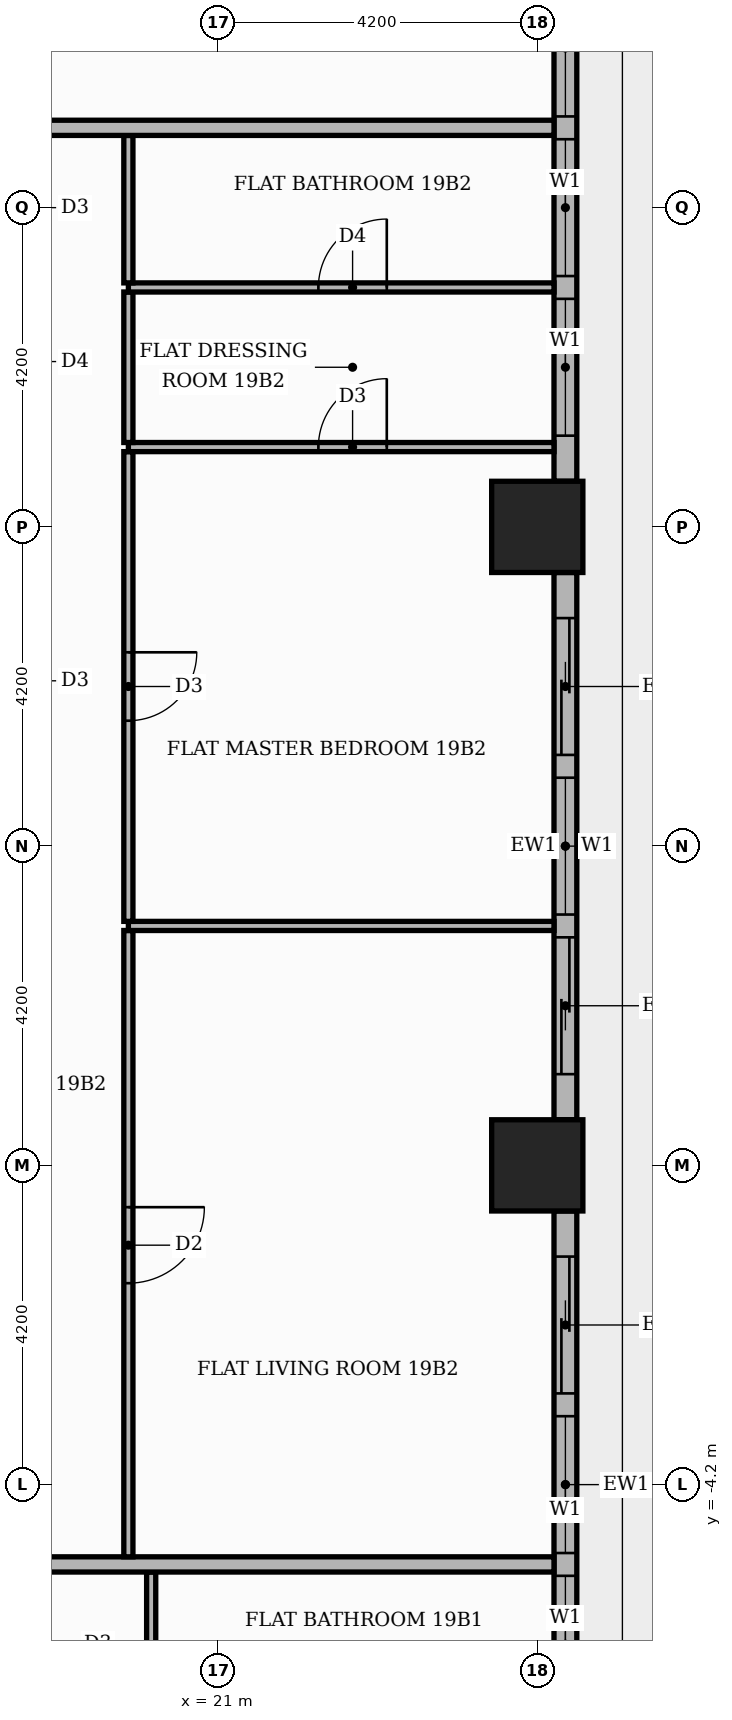
"""IFC4 building model, lengths in metres.
Left out: names, types, materials, properties, quantities, classifications, styles, units other than length and angle.
Written with IfcOpenShell. Run it as: python <this file> out.ifc"""

import sys

from ifc_helpers import new_model, si_unit, direction, frame, frame_2d, origin, origin_2d, place, context, subcontext, project, spatial, rectangle, extrude, element, fill, save


model = new_model("IFC4")
c1 = context("Model", 3, precision=1e-05, world=origin(), true_north=direction((0.0, 1.0)))
c2 = subcontext(c1, "Body", "Model", "MODEL_VIEW")
j1 = project(units=[si_unit("LENGTHUNIT", "METRE"), si_unit("PLANEANGLEUNIT", "RADIAN")], contexts=[c1])
p1 = place(None, origin())
s1 = spatial("IfcSite", under=j1, at=p1, CompositionType="ELEMENT")
p2 = place(p1, origin())
s2 = spatial("IfcBuilding", under=s1, at=p2, CompositionType="ELEMENT")
p3 = place(p2, frame((0.0, 0.0, 83.1)))
s3 = spatial("IfcBuildingStorey", under=s2, at=p3, CompositionType="ELEMENT", Elevation=83.1)
for number, where, z_axis, x_axis in (
    (1, (25.2, 0.0, 0.0), (0.0, 0.0, 1.0), (1.0, 0.0, 0.0)),
    (2, (25.2, 8.4, 0.0), (0.0, 0.0, 1.0), (1.0, 0.0, 0.0)),
):
    element("IfcColumn", number, at=place(p3, frame(where, z_axis=z_axis, x_axis=x_axis)), inside=s3, PredefinedType="COLUMN", context=c2, shape_type="SweptSolid", body=[
        extrude(rectangle(XDim=1.2, YDim=1.2, at=origin_2d()), origin(), (0.0, 0.0, 1.0), 3.9),
    ])
p4 = place(p3, frame((25.57, -7.8, 0.0), z_axis=(0.0, 0.0, 1.0), x_axis=(0.0, 1.0, 0.0)))
e3 = element("IfcWall", 3, at=p4, inside=s3, PredefinedType="STANDARD", context=c2, shape_type="SweptSolid", body=[
    extrude(rectangle(XDim=7.2, YDim=0.3, at=frame_2d((3.6, 0.0))), origin(), (0.0, 0.0, 1.0), 3.48),
])
p5 = place(p4, frame((0.6, 0.0, 0.9)))
e4 = element("IfcOpeningElement", 4, at=p5, cuts=e3, PredefinedType="OPENING", context=c2, shape_type="SweptSolid", body=[
    extrude(rectangle(XDim=1.8, YDim=2.1, at=frame_2d((0.9, 1.05))), frame((0.0, 0.16, 0.0), z_axis=(0.0, -1.0, 0.0), x_axis=(1.0, 0.0, 0.0)), (0.0, 0.0, 1.0), 0.32),
])
p6 = place(p4, frame((2.7, 0.0, 0.9)))
e5 = element("IfcOpeningElement", 5, at=p6, cuts=e3, PredefinedType="OPENING", context=c2, shape_type="SweptSolid", body=[
    extrude(rectangle(XDim=1.8, YDim=2.1, at=frame_2d((0.9, 1.05))), frame((0.0, 0.16, 0.0), z_axis=(0.0, -1.0, 0.0), x_axis=(1.0, 0.0, 0.0)), (0.0, 0.0, 1.0), 0.32),
])
p7 = place(p4, frame((4.8, 0.0, 0.0)))
e6 = element("IfcOpeningElement", 6, at=p7, cuts=e3, PredefinedType="OPENING", context=c2, shape_type="SweptSolid", body=[
    extrude(rectangle(XDim=1.8, YDim=2.4, at=frame_2d((0.9, 1.2))), frame((0.0, 0.16, 0.0), z_axis=(0.0, -1.0, 0.0), x_axis=(1.0, 0.0, 0.0)), (0.0, 0.0, 1.0), 0.32),
])
p8 = place(p3, frame((25.57, 0.6, 0.0), z_axis=(0.0, 0.0, 1.0), x_axis=(0.0, 1.0, 0.0)))
e7 = element("IfcWall", 7, at=p8, inside=s3, PredefinedType="STANDARD", context=c2, shape_type="SweptSolid", body=[
    extrude(rectangle(XDim=7.2, YDim=0.3, at=frame_2d((3.6, 0.0))), origin(), (0.0, 0.0, 1.0), 3.48),
])
p9 = place(p8, frame((0.6, 0.0, 0.0)))
e8 = element("IfcOpeningElement", 8, at=p9, cuts=e7, PredefinedType="OPENING", context=c2, shape_type="SweptSolid", body=[
    extrude(rectangle(XDim=1.8, YDim=2.4, at=frame_2d((0.9, 1.2))), frame((0.0, 0.16, 0.0), z_axis=(0.0, -1.0, 0.0), x_axis=(1.0, 0.0, 0.0)), (0.0, 0.0, 1.0), 0.32),
])
p10 = place(p8, frame((2.7, 0.0, 0.9)))
e9 = element("IfcOpeningElement", 9, at=p10, cuts=e7, PredefinedType="OPENING", context=c2, shape_type="SweptSolid", body=[
    extrude(rectangle(XDim=1.8, YDim=2.1, at=frame_2d((0.9, 1.05))), frame((0.0, 0.16, 0.0), z_axis=(0.0, -1.0, 0.0), x_axis=(1.0, 0.0, 0.0)), (0.0, 0.0, 1.0), 0.32),
])
p11 = place(p8, frame((4.8, 0.0, 0.0)))
e10 = element("IfcOpeningElement", 10, at=p11, cuts=e7, PredefinedType="OPENING", context=c2, shape_type="SweptSolid", body=[
    extrude(rectangle(XDim=1.8, YDim=2.4, at=frame_2d((0.9, 1.2))), frame((0.0, 0.16, 0.0), z_axis=(0.0, -1.0, 0.0), x_axis=(1.0, 0.0, 0.0)), (0.0, 0.0, 1.0), 0.32),
])
p12 = place(p3, frame((25.57, 9.0, 0.0), z_axis=(0.0, 0.0, 1.0), x_axis=(0.0, 1.0, 0.0)))
e11 = element("IfcWall", 11, at=p12, inside=s3, PredefinedType="STANDARD", context=c2, shape_type="SweptSolid", body=[
    extrude(rectangle(XDim=7.2, YDim=0.3, at=frame_2d((3.6, 0.0))), origin(), (0.0, 0.0, 1.0), 3.48),
])
p13 = place(p12, frame((0.6, 0.0, 0.9)))
e12 = element("IfcOpeningElement", 12, at=p13, cuts=e11, PredefinedType="OPENING", context=c2, shape_type="SweptSolid", body=[
    extrude(rectangle(XDim=1.8, YDim=2.1, at=frame_2d((0.9, 1.05))), frame((0.0, 0.16, 0.0), z_axis=(0.0, -1.0, 0.0), x_axis=(1.0, 0.0, 0.0)), (0.0, 0.0, 1.0), 0.32),
])
p14 = place(p12, frame((2.7, 0.0, 0.9)))
e13 = element("IfcOpeningElement", 13, at=p14, cuts=e11, PredefinedType="OPENING", context=c2, shape_type="SweptSolid", body=[
    extrude(rectangle(XDim=1.8, YDim=2.1, at=frame_2d((0.9, 1.05))), frame((0.0, 0.16, 0.0), z_axis=(0.0, -1.0, 0.0), x_axis=(1.0, 0.0, 0.0)), (0.0, 0.0, 1.0), 0.32),
])
p15 = place(p12, frame((4.8, 0.0, 0.9)))
e14 = element("IfcOpeningElement", 14, at=p15, cuts=e11, PredefinedType="OPENING", context=c2, shape_type="SweptSolid", body=[
    extrude(rectangle(XDim=1.8, YDim=2.1, at=frame_2d((0.9, 1.05))), frame((0.0, 0.16, 0.0), z_axis=(0.0, -1.0, 0.0), x_axis=(1.0, 0.0, 0.0)), (0.0, 0.0, 1.0), 0.32),
])
p16 = place(p3, frame((20.12, -7.29, 0.0), z_axis=(0.0, 0.0, 1.0), x_axis=(0.0, 1.0, 0.0)))
e15 = element("IfcWall", 15, at=p16, inside=s3, PredefinedType="PARTITIONING", context=c2, shape_type="SweptSolid", body=[
    extrude(rectangle(XDim=1.94, YDim=0.12, at=frame_2d((0.97, 0.0))), origin(), (0.0, 0.0, 1.0), 3.48),
])
p17 = place(p3, frame((13.65, -5.25, 0.0), z_axis=(0.0, 0.0, 1.0), x_axis=(1.0, 0.0, 0.0)))
e16 = element("IfcWall", 16, at=p17, inside=s3, PredefinedType="PARTITIONING", context=c2, shape_type="SweptSolid", body=[
    extrude(rectangle(XDim=11.77, YDim=0.2, at=frame_2d((5.885, 0.0))), origin(), (0.0, 0.0, 1.0), 3.48),
])
p18 = place(p3, frame((19.82, -5.15, 0.0), z_axis=(0.0, 0.0, 1.0), x_axis=(0.0, 1.0, 0.0)))
e17 = element("IfcWall", 17, at=p18, inside=s3, PredefinedType="PARTITIONING", context=c2, shape_type="SweptSolid", body=[
    extrude(rectangle(XDim=8.24, YDim=0.12, at=frame_2d((4.12, 0.0))), origin(), (0.0, 0.0, 1.0), 3.48),
])
p19 = place(p18, frame((3.6, 0.0, 0.0)))
e18 = element("IfcOpeningElement", 18, at=p19, cuts=e17, PredefinedType="OPENING", context=c2, shape_type="SweptSolid", body=[
    extrude(rectangle(XDim=1.0, YDim=2.1, at=frame_2d((0.5, 1.05))), frame((0.0, 0.07, 0.0), z_axis=(0.0, -1.0, 0.0), x_axis=(1.0, 0.0, 0.0)), (0.0, 0.0, 1.0), 0.14),
])
p20 = place(p3, frame((19.82, 3.15, 0.0), z_axis=(0.0, 0.0, 1.0), x_axis=(1.0, 0.0, 0.0)))
e19 = element("IfcWall", 19, at=p20, inside=s3, PredefinedType="PARTITIONING", context=c2, shape_type="SweptSolid", body=[
    extrude(rectangle(XDim=5.6, YDim=0.12, at=frame_2d((2.8, 0.0))), origin(), (0.0, 0.0, 1.0), 3.48),
])
p21 = place(p3, frame((19.82, 3.21, 0.0), z_axis=(0.0, 0.0, 1.0), x_axis=(0.0, 1.0, 0.0)))
e20 = element("IfcWall", 20, at=p21, inside=s3, PredefinedType="PARTITIONING", context=c2, shape_type="SweptSolid", body=[
    extrude(rectangle(XDim=6.18, YDim=0.12, at=frame_2d((3.09, 0.0))), origin(), (0.0, 0.0, 1.0), 3.48),
])
p22 = place(p21, frame((2.64, 0.0, 0.0)))
e21 = element("IfcOpeningElement", 21, at=p22, cuts=e20, PredefinedType="OPENING", context=c2, shape_type="SweptSolid", body=[
    extrude(rectangle(XDim=0.9, YDim=2.1, at=frame_2d((0.45, 1.05))), frame((0.0, 0.07, 0.0), z_axis=(0.0, -1.0, 0.0), x_axis=(1.0, 0.0, 0.0)), (0.0, 0.0, 1.0), 0.14),
])
p23 = place(p3, frame((19.82, 9.45, 0.0), z_axis=(0.0, 0.0, 1.0), x_axis=(1.0, 0.0, 0.0)))
e22 = element("IfcWall", 22, at=p23, inside=s3, PredefinedType="PARTITIONING", context=c2, shape_type="SweptSolid", body=[
    extrude(rectangle(XDim=5.6, YDim=0.12, at=frame_2d((2.8, 0.0))), origin(), (0.0, 0.0, 1.0), 3.48),
])
p24 = place(p23, frame((2.5, 0.0, 0.0)))
e23 = element("IfcOpeningElement", 23, at=p24, cuts=e22, PredefinedType="OPENING", context=c2, shape_type="SweptSolid", body=[
    extrude(rectangle(XDim=0.9, YDim=2.1, at=frame_2d((0.45, 1.05))), frame((0.0, 0.07, 0.0), z_axis=(0.0, -1.0, 0.0), x_axis=(1.0, 0.0, 0.0)), (0.0, 0.0, 1.0), 0.14),
])
p25 = place(p3, frame((19.82, 9.51, 0.0), z_axis=(0.0, 0.0, 1.0), x_axis=(0.0, 1.0, 0.0)))
e24 = element("IfcWall", 24, at=p25, inside=s3, PredefinedType="PARTITIONING", context=c2, shape_type="SweptSolid", body=[
    extrude(rectangle(XDim=1.98, YDim=0.12, at=frame_2d((0.99, 0.0))), origin(), (0.0, 0.0, 1.0), 3.48),
])
p26 = place(p3, frame((19.82, 11.55, 0.0), z_axis=(0.0, 0.0, 1.0), x_axis=(1.0, 0.0, 0.0)))
e25 = element("IfcWall", 25, at=p26, inside=s3, PredefinedType="PARTITIONING", context=c2, shape_type="SweptSolid", body=[
    extrude(rectangle(XDim=5.6, YDim=0.12, at=frame_2d((2.8, 0.0))), origin(), (0.0, 0.0, 1.0), 3.48),
])
p27 = place(p26, frame((2.5, 0.0, 0.0)))
e26 = element("IfcOpeningElement", 26, at=p27, cuts=e25, PredefinedType="OPENING", context=c2, shape_type="SweptSolid", body=[
    extrude(rectangle(XDim=0.9, YDim=2.1, at=frame_2d((0.45, 1.05))), frame((0.0, 0.07, 0.0), z_axis=(0.0, -1.0, 0.0), x_axis=(1.0, 0.0, 0.0)), (0.0, 0.0, 1.0), 0.14),
])
p28 = place(p3, frame((19.82, 11.61, 0.0), z_axis=(0.0, 0.0, 1.0), x_axis=(0.0, 1.0, 0.0)))
e27 = element("IfcWall", 27, at=p28, inside=s3, PredefinedType="PARTITIONING", context=c2, shape_type="SweptSolid", body=[
    extrude(rectangle(XDim=1.94, YDim=0.12, at=frame_2d((0.97, 0.0))), origin(), (0.0, 0.0, 1.0), 3.48),
])
p29 = place(p3, frame((-13.65, 13.65, 0.0), z_axis=(0.0, 0.0, 1.0), x_axis=(1.0, 0.0, 0.0)))
e28 = element("IfcWall", 28, at=p29, inside=s3, PredefinedType="PARTITIONING", context=c2, shape_type="SweptSolid", body=[
    extrude(rectangle(XDim=39.07, YDim=0.2, at=frame_2d((19.535, 0.0))), origin(), (0.0, 0.0, 1.0), 3.48),
])
p30 = place(p29, frame((24.65, 0.0, 0.0)))
e29 = element("IfcOpeningElement", 29, at=p30, cuts=e28, PredefinedType="OPENING", context=c2, shape_type="SweptSolid", body=[
    extrude(rectangle(XDim=1.1, YDim=2.4, at=frame_2d((0.55, 1.2))), frame((0.0, 0.11, 0.0), z_axis=(0.0, -1.0, 0.0), x_axis=(1.0, 0.0, 0.0)), (0.0, 0.0, 1.0), 0.22),
])
p31 = place(p29, frame((16.25, 0.0, 0.0)))
e30 = element("IfcOpeningElement", 30, at=p31, cuts=e28, PredefinedType="OPENING", context=c2, shape_type="SweptSolid", body=[
    extrude(rectangle(XDim=1.1, YDim=2.4, at=frame_2d((0.55, 1.2))), frame((0.0, 0.11, 0.0), z_axis=(0.0, -1.0, 0.0), x_axis=(1.0, 0.0, 0.0)), (0.0, 0.0, 1.0), 0.22),
])
p32 = place(p5, origin())
e31 = element("IfcWindow", 31, at=p32, inside=s3, PartitioningType="SINGLE_PANEL", PredefinedType="WINDOW", context=c2, shape_type="SweptSolid", body=[
    extrude(rectangle(XDim=1.8, YDim=2.1, at=frame_2d((0.9, 1.05))), frame((0.0, 0.03, 0.0), z_axis=(0.0, -1.0, 0.0), x_axis=(1.0, 0.0, 0.0)), (0.0, 0.0, 1.0), 0.06),
])
fill(e4, e31)
p33 = place(p6, origin())
e32 = element("IfcWindow", 32, at=p33, inside=s3, PartitioningType="SINGLE_PANEL", PredefinedType="WINDOW", context=c2, shape_type="SweptSolid", body=[
    extrude(rectangle(XDim=1.8, YDim=2.1, at=frame_2d((0.9, 1.05))), frame((0.0, 0.03, 0.0), z_axis=(0.0, -1.0, 0.0), x_axis=(1.0, 0.0, 0.0)), (0.0, 0.0, 1.0), 0.06),
])
fill(e5, e32)
p34 = place(p7, origin())
e33 = element("IfcDoor", 33, at=p34, inside=s3, OperationType="SLIDING_TO_RIGHT", PredefinedType="DOOR", context=c2, shape_type="SweptSolid", body=[
    extrude(rectangle(XDim=1.8, YDim=2.4, at=frame_2d((0.9, 1.2))), frame((0.0, 0.025, 0.0), z_axis=(0.0, -1.0, 0.0), x_axis=(1.0, 0.0, 0.0)), (0.0, 0.0, 1.0), 0.05),
])
fill(e6, e33)
p35 = place(p9, origin())
e34 = element("IfcDoor", 34, at=p35, inside=s3, OperationType="SLIDING_TO_LEFT", PredefinedType="DOOR", context=c2, shape_type="SweptSolid", body=[
    extrude(rectangle(XDim=1.8, YDim=2.4, at=frame_2d((0.9, 1.2))), frame((0.0, 0.025, 0.0), z_axis=(0.0, -1.0, 0.0), x_axis=(1.0, 0.0, 0.0)), (0.0, 0.0, 1.0), 0.05),
])
fill(e8, e34)
p36 = place(p10, origin())
e35 = element("IfcWindow", 35, at=p36, inside=s3, PartitioningType="SINGLE_PANEL", PredefinedType="WINDOW", context=c2, shape_type="SweptSolid", body=[
    extrude(rectangle(XDim=1.8, YDim=2.1, at=frame_2d((0.9, 1.05))), frame((0.0, 0.03, 0.0), z_axis=(0.0, -1.0, 0.0), x_axis=(1.0, 0.0, 0.0)), (0.0, 0.0, 1.0), 0.06),
])
fill(e9, e35)
p37 = place(p11, origin())
e36 = element("IfcDoor", 36, at=p37, inside=s3, OperationType="SLIDING_TO_RIGHT", PredefinedType="DOOR", context=c2, shape_type="SweptSolid", body=[
    extrude(rectangle(XDim=1.8, YDim=2.4, at=frame_2d((0.9, 1.2))), frame((0.0, 0.025, 0.0), z_axis=(0.0, -1.0, 0.0), x_axis=(1.0, 0.0, 0.0)), (0.0, 0.0, 1.0), 0.05),
])
fill(e10, e36)
p38 = place(p13, origin())
e37 = element("IfcWindow", 37, at=p38, inside=s3, PartitioningType="SINGLE_PANEL", PredefinedType="WINDOW", context=c2, shape_type="SweptSolid", body=[
    extrude(rectangle(XDim=1.8, YDim=2.1, at=frame_2d((0.9, 1.05))), frame((0.0, 0.03, 0.0), z_axis=(0.0, -1.0, 0.0), x_axis=(1.0, 0.0, 0.0)), (0.0, 0.0, 1.0), 0.06),
])
fill(e12, e37)
p39 = place(p14, origin())
e38 = element("IfcWindow", 38, at=p39, inside=s3, PartitioningType="SINGLE_PANEL", PredefinedType="WINDOW", context=c2, shape_type="SweptSolid", body=[
    extrude(rectangle(XDim=1.8, YDim=2.1, at=frame_2d((0.9, 1.05))), frame((0.0, 0.03, 0.0), z_axis=(0.0, -1.0, 0.0), x_axis=(1.0, 0.0, 0.0)), (0.0, 0.0, 1.0), 0.06),
])
fill(e13, e38)
p40 = place(p15, origin())
e39 = element("IfcWindow", 39, at=p40, inside=s3, PartitioningType="SINGLE_PANEL", PredefinedType="WINDOW", context=c2, shape_type="SweptSolid", body=[
    extrude(rectangle(XDim=1.8, YDim=2.1, at=frame_2d((0.9, 1.05))), frame((0.0, 0.03, 0.0), z_axis=(0.0, -1.0, 0.0), x_axis=(1.0, 0.0, 0.0)), (0.0, 0.0, 1.0), 0.06),
])
fill(e14, e39)
p41 = place(p19, frame((1.0, 0.0, 0.0), z_axis=(0.0, 0.0, 1.0), x_axis=(-1.0, 0.0, 0.0)))
e40 = element("IfcDoor", 40, at=p41, inside=s3, OperationType="SINGLE_SWING_RIGHT", PredefinedType="DOOR", context=c2, shape_type="SweptSolid", body=[
    extrude(rectangle(XDim=1.0, YDim=2.1, at=frame_2d((0.5, 1.05))), frame((0.0, 0.025, 0.0), z_axis=(0.0, -1.0, 0.0), x_axis=(1.0, 0.0, 0.0)), (0.0, 0.0, 1.0), 0.05),
])
fill(e18, e40)
p42 = place(p22, frame((0.9, 0.0, 0.0), z_axis=(0.0, 0.0, 1.0), x_axis=(-1.0, 0.0, 0.0)))
e41 = element("IfcDoor", 41, at=p42, inside=s3, OperationType="SINGLE_SWING_RIGHT", PredefinedType="DOOR", context=c2, shape_type="SweptSolid", body=[
    extrude(rectangle(XDim=0.9, YDim=2.1, at=frame_2d((0.45, 1.05))), frame((0.0, 0.025, 0.0), z_axis=(0.0, -1.0, 0.0), x_axis=(1.0, 0.0, 0.0)), (0.0, 0.0, 1.0), 0.05),
])
fill(e21, e41)
p43 = place(p24, origin())
e42 = element("IfcDoor", 42, at=p43, inside=s3, OperationType="SINGLE_SWING_RIGHT", PredefinedType="DOOR", context=c2, shape_type="SweptSolid", body=[
    extrude(rectangle(XDim=0.9, YDim=2.1, at=frame_2d((0.45, 1.05))), frame((0.0, 0.025, 0.0), z_axis=(0.0, -1.0, 0.0), x_axis=(1.0, 0.0, 0.0)), (0.0, 0.0, 1.0), 0.05),
])
fill(e23, e42)
p44 = place(p27, origin())
e43 = element("IfcDoor", 43, at=p44, inside=s3, OperationType="SINGLE_SWING_RIGHT", PredefinedType="DOOR", context=c2, shape_type="SweptSolid", body=[
    extrude(rectangle(XDim=0.9, YDim=2.1, at=frame_2d((0.45, 1.05))), frame((0.0, 0.025, 0.0), z_axis=(0.0, -1.0, 0.0), x_axis=(1.0, 0.0, 0.0)), (0.0, 0.0, 1.0), 0.05),
])
fill(e26, e43)
save(model, sys.argv[1])
